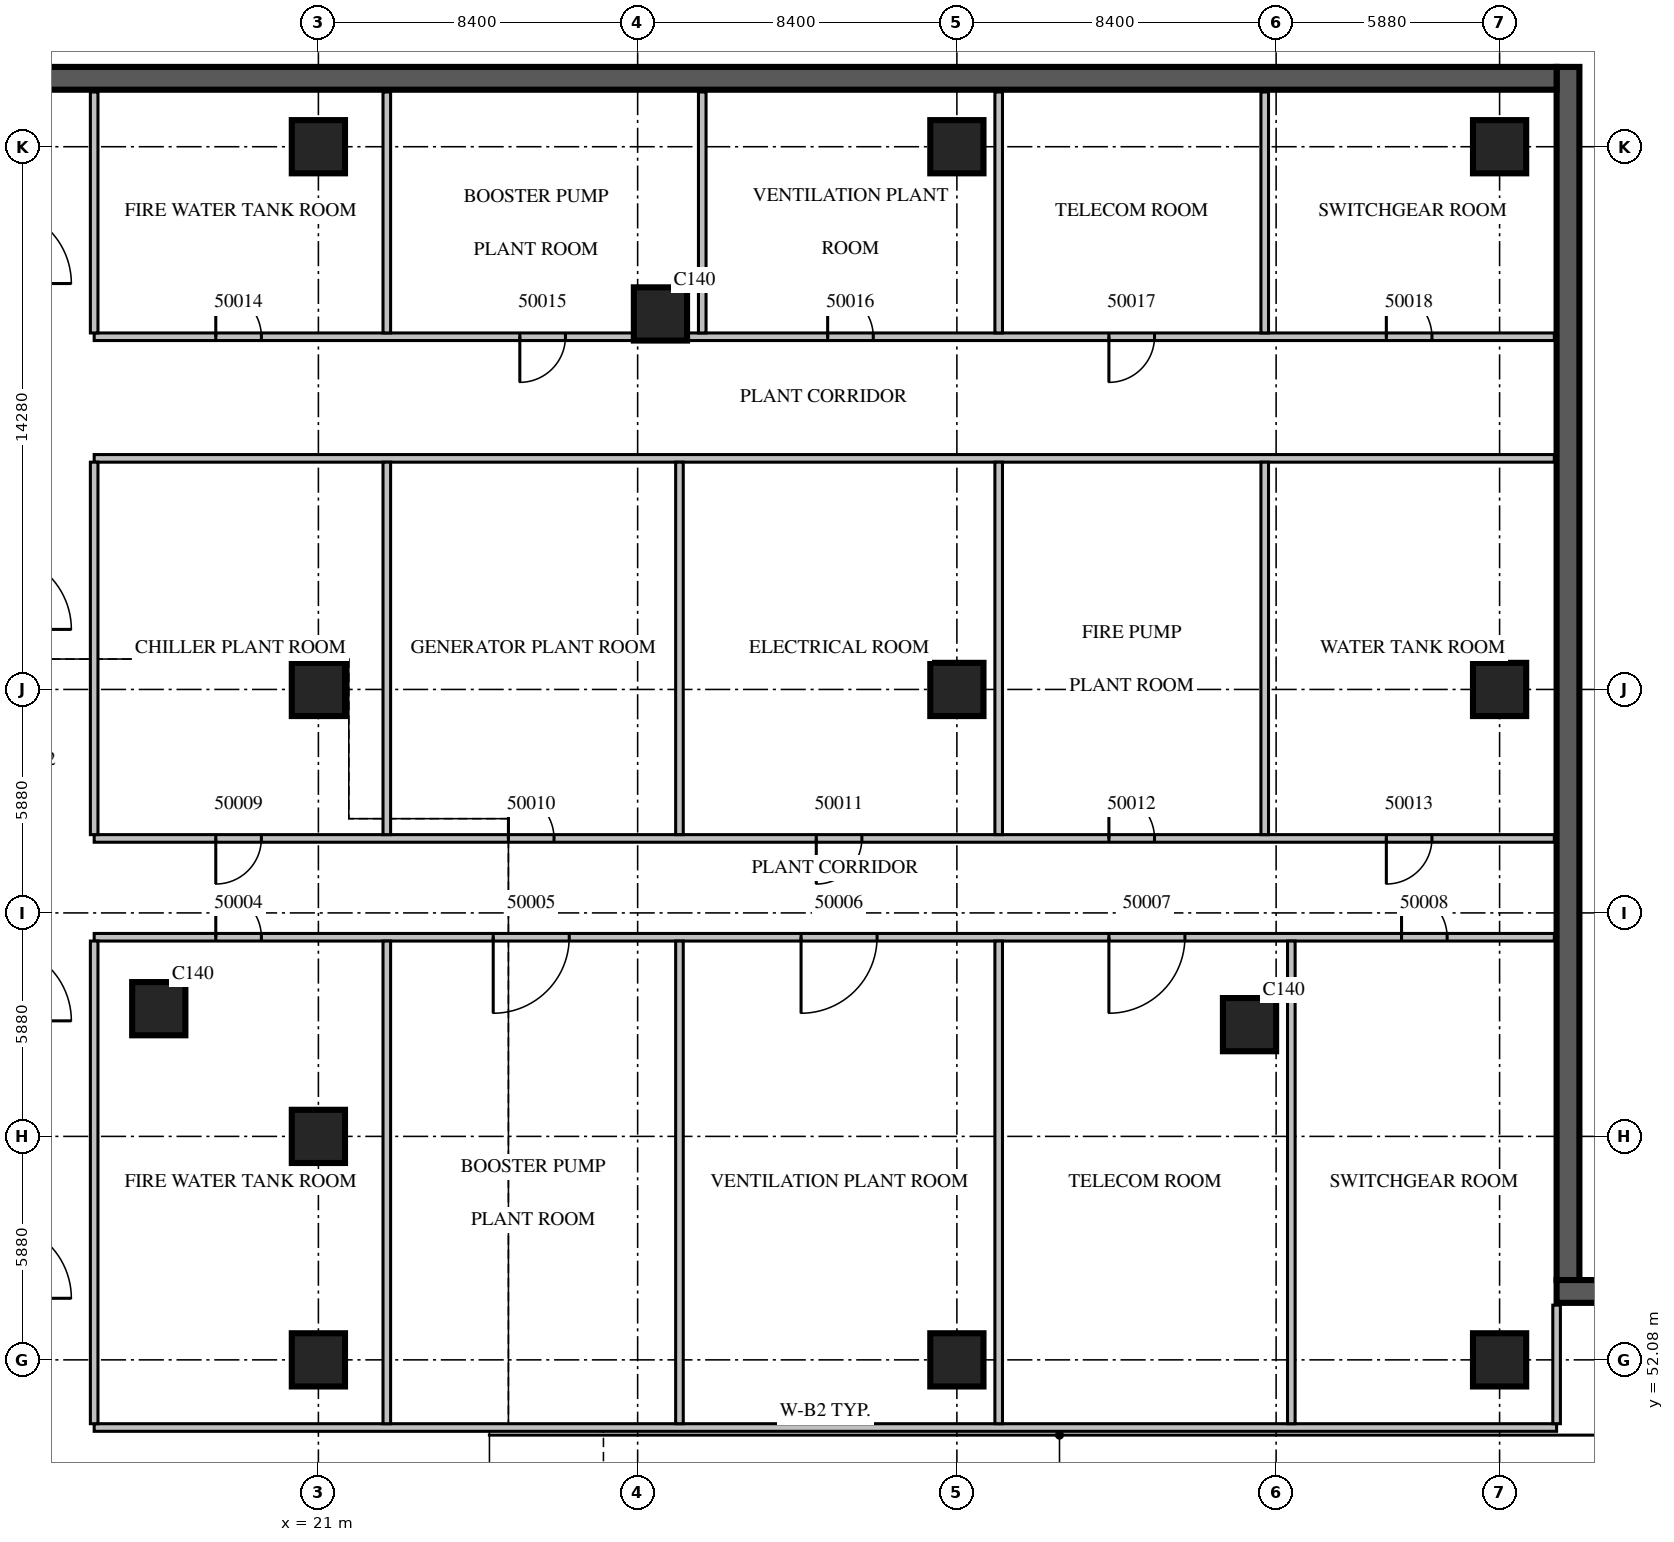
"""IFC4 building model, lengths in metres.
Left out: names, types, materials, properties, quantities, classifications, styles, units other than length and angle.
Written with IfcOpenShell. Run it as: python <this file> out.ifc"""

import sys

from ifc_helpers import new_model, si_unit, direction, frame, frame_2d, origin, origin_2d, place, context, subcontext, project, spatial, rectangle, extrude, source, transform, mapped, element, fill, save


model = new_model("IFC4")
c1 = context("Model", 3, precision=1e-05, world=origin(), true_north=direction((0.0, 1.0)))
c2 = subcontext(c1, "Body", "Model", "MODEL_VIEW")
j1 = project(units=[si_unit("LENGTHUNIT", "METRE"), si_unit("PLANEANGLEUNIT", "RADIAN")], contexts=[c1])
p1 = place(None, origin())
s1 = spatial("IfcSite", under=j1, at=p1, CompositionType="ELEMENT")
p2 = place(p1, origin())
s2 = spatial("IfcBuilding", under=s1, at=p2, CompositionType="ELEMENT")
p3 = place(p2, frame((0.0, 0.0, -13.5)))
s3 = spatial("IfcBuildingStorey", under=s2, at=p3, CompositionType="ELEMENT", Elevation=-13.5)
p4 = place(p3, frame((53.88, 54.18, 0.0), z_axis=(0.0, 0.0, 1.0), x_axis=(0.0, 1.0, 0.0)))
e1 = element("IfcWall", 1, at=p4, inside=s3, PredefinedType="SOLIDWALL", context=c2, shape_type="SweptSolid", body=[
    extrude(rectangle(XDim=31.92, YDim=0.6, at=frame_2d((15.96, 0.0))), origin(), (0.0, 0.0, 1.0), 4.5),
])
p5 = place(p3, frame((53.58, 85.8, 0.0), z_axis=(0.0, 0.0, 1.0), x_axis=(-1.0, 0.0, 0.0)))
e2 = element("IfcWall", 2, at=p5, inside=s3, PredefinedType="SOLIDWALL", context=c2, shape_type="SweptSolid", body=[
    extrude(rectangle(XDim=55.68, YDim=0.6, at=frame_2d((27.84, 0.0))), origin(), (0.0, 0.0, 1.0), 4.5),
])
m1 = source(origin(), c2, "Body", "SweptSolid", [
    extrude(rectangle(XDim=31.92, YDim=0.6, at=frame_2d((15.96, 0.0))), origin(), (0.0, 0.0, 1.0), 4.5),
])
p6 = place(p3, frame((85.5, 53.88, 0.0), z_axis=(0.0, 0.0, 1.0), x_axis=(-1.0, 0.0, 0.0)))
e3 = element("IfcWall", 3, at=p6, inside=s3, PredefinedType="SOLIDWALL", context=c2, shape_type="MappedRepresentation", body=[
    mapped(m1, transform((0.0, 0.0, 0.0), scale=1.0)),
])
m2 = source(origin(), c2, "Body", "SweptSolid", [
    extrude(rectangle(XDim=1.4, YDim=1.4, at=origin_2d()), origin(), (0.0, 0.0, 1.0), 4.5),
])
for number, where, z_axis, x_axis in (
    (4, (16.8, 61.32, 0.0), (0.0, 0.0, 1.0), (1.0, 0.0, 0.0)),
    (5, (21.0, 52.08, 0.0), (0.0, 0.0, 1.0), (1.0, 0.0, 0.0)),
    (6, (21.0, 57.96, 0.0), (0.0, 0.0, 1.0), (1.0, 0.0, 0.0)),
    (7, (21.0, 69.72, 0.0), (0.0, 0.0, 1.0), (1.0, 0.0, 0.0)),
    (8, (21.0, 84.0, 0.0), (0.0, 0.0, 1.0), (1.0, 0.0, 0.0)),
    (9, (30.0, 79.6, 0.0), (0.0, 0.0, 1.0), (1.0, 0.0, 0.0)),
    (10, (37.8, 52.08, 0.0), (0.0, 0.0, 1.0), (1.0, 0.0, 0.0)),
    (11, (37.8, 69.72, 0.0), (0.0, 0.0, 1.0), (1.0, 0.0, 0.0)),
    (12, (37.8, 84.0, 0.0), (0.0, 0.0, 1.0), (1.0, 0.0, 0.0)),
    (13, (45.5, 60.9, 0.0), (0.0, 0.0, 1.0), (1.0, 0.0, 0.0)),
    (14, (52.08, 52.08, 0.0), (0.0, 0.0, 1.0), (1.0, 0.0, 0.0)),
    (15, (52.08, 69.72, 0.0), (0.0, 0.0, 1.0), (1.0, 0.0, 0.0)),
    (16, (52.08, 84.0, 0.0), (0.0, 0.0, 1.0), (1.0, 0.0, 0.0)),
):
    element("IfcColumn", number, at=place(p3, frame(where, z_axis=z_axis, x_axis=x_axis)), inside=s3, PredefinedType="COLUMN", context=c2, shape_type="MappedRepresentation", body=[
        mapped(m2, transform((0.0, 0.0, 0.0), scale=1.0)),
    ])
p7 = place(p3, frame((15.1, 50.3, 0.0), z_axis=(0.0, 0.0, 1.0), x_axis=(1.0, 0.0, 0.0)))
e17 = element("IfcWall", 17, at=p7, inside=s3, PredefinedType="PARTITIONING", context=c2, shape_type="SweptSolid", body=[
    extrude(rectangle(XDim=38.48, YDim=0.2, at=frame_2d((19.24, 0.0))), origin(), (0.0, 0.0, 1.0), 3.9),
])
p8 = place(p3, frame((15.1, 63.2, 0.0), z_axis=(0.0, 0.0, 1.0), x_axis=(1.0, 0.0, 0.0)))
e18 = element("IfcWall", 18, at=p8, inside=s3, PredefinedType="PARTITIONING", context=c2, shape_type="SweptSolid", body=[
    extrude(rectangle(XDim=38.42, YDim=0.2, at=frame_2d((19.21, 0.0))), origin(), (0.0, 0.0, 1.0), 3.9),
])
m3 = source(origin(), c2, "Body", "SweptSolid", [
    extrude(rectangle(XDim=1.2, YDim=2.1, at=frame_2d((0.6, 1.05))), frame((0.0, 0.11, 0.0), z_axis=(0.0, -1.0, 0.0), x_axis=(1.0, 0.0, 0.0)), (0.0, 0.0, 1.0), 0.22),
])
p9 = place(p8, frame((3.2, 0.0, 0.0)))
e19 = element("IfcOpeningElement", 19, at=p9, cuts=e18, PredefinedType="OPENING", context=c2, shape_type="MappedRepresentation", body=[
    mapped(m3, transform((0.0, 0.0, 0.0), scale=1.0)),
])
m4 = source(origin(), c2, "Body", "SweptSolid", [
    extrude(rectangle(XDim=2.0, YDim=2.1, at=frame_2d((1.0, 1.05))), frame((0.0, 0.11, 0.0), z_axis=(0.0, -1.0, 0.0), x_axis=(1.0, 0.0, 0.0)), (0.0, 0.0, 1.0), 0.22),
])
p10 = place(p8, frame((10.5, 0.0, 0.0)))
e20 = element("IfcOpeningElement", 20, at=p10, cuts=e18, PredefinedType="OPENING", context=c2, shape_type="MappedRepresentation", body=[
    mapped(m4, transform((0.0, 0.0, 0.0), scale=1.0)),
])
p11 = place(p8, frame((18.6, 0.0, 0.0)))
e21 = element("IfcOpeningElement", 21, at=p11, cuts=e18, PredefinedType="OPENING", context=c2, shape_type="MappedRepresentation", body=[
    mapped(m4, transform((0.0, 0.0, 0.0), scale=1.0)),
])
p12 = place(p8, frame((26.7, 0.0, 0.0)))
e22 = element("IfcOpeningElement", 22, at=p12, cuts=e18, PredefinedType="OPENING", context=c2, shape_type="MappedRepresentation", body=[
    mapped(m4, transform((0.0, 0.0, 0.0), scale=1.0)),
])
p13 = place(p8, frame((34.4, 0.0, 0.0)))
e23 = element("IfcOpeningElement", 23, at=p13, cuts=e18, PredefinedType="OPENING", context=c2, shape_type="MappedRepresentation", body=[
    mapped(m3, transform((0.0, 0.0, 0.0), scale=1.0)),
])
m5 = source(origin(), c2, "Body", "SweptSolid", [
    extrude(rectangle(XDim=38.42, YDim=0.2, at=frame_2d((19.21, 0.0))), origin(), (0.0, 0.0, 1.0), 3.9),
])
p14 = place(p3, frame((15.1, 65.8, 0.0), z_axis=(0.0, 0.0, 1.0), x_axis=(1.0, 0.0, 0.0)))
e24 = element("IfcWall", 24, at=p14, inside=s3, PredefinedType="PARTITIONING", context=c2, shape_type="MappedRepresentation", body=[
    mapped(m5, transform((0.0, 0.0, 0.0), scale=1.0)),
])
p15 = place(p14, frame((3.2, 0.0, 0.0)))
e25 = element("IfcOpeningElement", 25, at=p15, cuts=e24, PredefinedType="OPENING", context=c2, shape_type="MappedRepresentation", body=[
    mapped(m3, transform((0.0, 0.0, 0.0), scale=1.0)),
])
p16 = place(p14, frame((10.9, 0.0, 0.0)))
e26 = element("IfcOpeningElement", 26, at=p16, cuts=e24, PredefinedType="OPENING", context=c2, shape_type="MappedRepresentation", body=[
    mapped(m3, transform((0.0, 0.0, 0.0), scale=1.0)),
])
p17 = place(p14, frame((19.0, 0.0, 0.0)))
e27 = element("IfcOpeningElement", 27, at=p17, cuts=e24, PredefinedType="OPENING", context=c2, shape_type="MappedRepresentation", body=[
    mapped(m3, transform((0.0, 0.0, 0.0), scale=1.0)),
])
p18 = place(p14, frame((26.7, 0.0, 0.0)))
e28 = element("IfcOpeningElement", 28, at=p18, cuts=e24, PredefinedType="OPENING", context=c2, shape_type="MappedRepresentation", body=[
    mapped(m3, transform((0.0, 0.0, 0.0), scale=1.0)),
])
p19 = place(p14, frame((34.0, 0.0, 0.0)))
e29 = element("IfcOpeningElement", 29, at=p19, cuts=e24, PredefinedType="OPENING", context=c2, shape_type="MappedRepresentation", body=[
    mapped(m3, transform((0.0, 0.0, 0.0), scale=1.0)),
])
p20 = place(p3, frame((15.1, 75.8, 0.0), z_axis=(0.0, 0.0, 1.0), x_axis=(1.0, 0.0, 0.0)))
e30 = element("IfcWall", 30, at=p20, inside=s3, PredefinedType="PARTITIONING", context=c2, shape_type="MappedRepresentation", body=[
    mapped(m5, transform((0.0, 0.0, 0.0), scale=1.0)),
])
p21 = place(p3, frame((15.1, 79.0, 0.0), z_axis=(0.0, 0.0, 1.0), x_axis=(1.0, 0.0, 0.0)))
e31 = element("IfcWall", 31, at=p21, inside=s3, PredefinedType="PARTITIONING", context=c2, shape_type="MappedRepresentation", body=[
    mapped(m5, transform((0.0, 0.0, 0.0), scale=1.0)),
])
p22 = place(p21, frame((3.2, 0.0, 0.0)))
e32 = element("IfcOpeningElement", 32, at=p22, cuts=e31, PredefinedType="OPENING", context=c2, shape_type="MappedRepresentation", body=[
    mapped(m3, transform((0.0, 0.0, 0.0), scale=1.0)),
])
p23 = place(p21, frame((11.2, 0.0, 0.0)))
e33 = element("IfcOpeningElement", 33, at=p23, cuts=e31, PredefinedType="OPENING", context=c2, shape_type="MappedRepresentation", body=[
    mapped(m3, transform((0.0, 0.0, 0.0), scale=1.0)),
])
p24 = place(p21, frame((19.3, 0.0, 0.0)))
e34 = element("IfcOpeningElement", 34, at=p24, cuts=e31, PredefinedType="OPENING", context=c2, shape_type="MappedRepresentation", body=[
    mapped(m3, transform((0.0, 0.0, 0.0), scale=1.0)),
])
p25 = place(p21, frame((26.7, 0.0, 0.0)))
e35 = element("IfcOpeningElement", 35, at=p25, cuts=e31, PredefinedType="OPENING", context=c2, shape_type="MappedRepresentation", body=[
    mapped(m3, transform((0.0, 0.0, 0.0), scale=1.0)),
])
p26 = place(p21, frame((34.0, 0.0, 0.0)))
e36 = element("IfcOpeningElement", 36, at=p26, cuts=e31, PredefinedType="OPENING", context=c2, shape_type="MappedRepresentation", body=[
    mapped(m3, transform((0.0, 0.0, 0.0), scale=1.0)),
])
p27 = place(p3, frame((15.1, 50.4, 0.0), z_axis=(0.0, 0.0, 1.0), x_axis=(0.0, 1.0, 0.0)))
e37 = element("IfcWall", 37, at=p27, inside=s3, PredefinedType="PARTITIONING", context=c2, shape_type="SweptSolid", body=[
    extrude(rectangle(XDim=12.7, YDim=0.2, at=frame_2d((6.35, 0.0))), origin(), (0.0, 0.0, 1.0), 3.9),
])
p28 = place(p3, frame((15.1, 65.9, 0.0), z_axis=(0.0, 0.0, 1.0), x_axis=(0.0, 1.0, 0.0)))
e38 = element("IfcWall", 38, at=p28, inside=s3, PredefinedType="PARTITIONING", context=c2, shape_type="SweptSolid", body=[
    extrude(rectangle(XDim=9.8, YDim=0.2, at=frame_2d((4.9, 0.0))), origin(), (0.0, 0.0, 1.0), 3.9),
])
p29 = place(p3, frame((15.1, 79.1, 0.0), z_axis=(0.0, 0.0, 1.0), x_axis=(0.0, 1.0, 0.0)))
e39 = element("IfcWall", 39, at=p29, inside=s3, PredefinedType="PARTITIONING", context=c2, shape_type="SweptSolid", body=[
    extrude(rectangle(XDim=6.34, YDim=0.2, at=frame_2d((3.17, 0.0))), origin(), (0.0, 0.0, 1.0), 3.9),
])
m6 = source(origin(), c2, "Body", "SweptSolid", [
    extrude(rectangle(XDim=12.7, YDim=0.2, at=frame_2d((6.35, 0.0))), origin(), (0.0, 0.0, 1.0), 3.9),
])
p30 = place(p3, frame((22.8, 50.4, 0.0), z_axis=(0.0, 0.0, 1.0), x_axis=(0.0, 1.0, 0.0)))
e40 = element("IfcWall", 40, at=p30, inside=s3, PredefinedType="PARTITIONING", context=c2, shape_type="MappedRepresentation", body=[
    mapped(m6, transform((0.0, 0.0, 0.0), scale=1.0)),
])
m7 = source(origin(), c2, "Body", "SweptSolid", [
    extrude(rectangle(XDim=9.8, YDim=0.2, at=frame_2d((4.9, 0.0))), origin(), (0.0, 0.0, 1.0), 3.9),
])
p31 = place(p3, frame((22.8, 65.9, 0.0), z_axis=(0.0, 0.0, 1.0), x_axis=(0.0, 1.0, 0.0)))
e41 = element("IfcWall", 41, at=p31, inside=s3, PredefinedType="PARTITIONING", context=c2, shape_type="MappedRepresentation", body=[
    mapped(m7, transform((0.0, 0.0, 0.0), scale=1.0)),
])
m8 = source(origin(), c2, "Body", "SweptSolid", [
    extrude(rectangle(XDim=6.34, YDim=0.2, at=frame_2d((3.17, 0.0))), origin(), (0.0, 0.0, 1.0), 3.9),
])
p32 = place(p3, frame((22.8, 79.1, 0.0), z_axis=(0.0, 0.0, 1.0), x_axis=(0.0, 1.0, 0.0)))
e42 = element("IfcWall", 42, at=p32, inside=s3, PredefinedType="PARTITIONING", context=c2, shape_type="MappedRepresentation", body=[
    mapped(m8, transform((0.0, 0.0, 0.0), scale=1.0)),
])
p33 = place(p3, frame((30.5, 50.4, 0.0), z_axis=(0.0, 0.0, 1.0), x_axis=(0.0, 1.0, 0.0)))
e43 = element("IfcWall", 43, at=p33, inside=s3, PredefinedType="PARTITIONING", context=c2, shape_type="MappedRepresentation", body=[
    mapped(m6, transform((0.0, 0.0, 0.0), scale=1.0)),
])
p34 = place(p3, frame((30.5, 65.9, 0.0), z_axis=(0.0, 0.0, 1.0), x_axis=(0.0, 1.0, 0.0)))
e44 = element("IfcWall", 44, at=p34, inside=s3, PredefinedType="PARTITIONING", context=c2, shape_type="MappedRepresentation", body=[
    mapped(m7, transform((0.0, 0.0, 0.0), scale=1.0)),
])
p35 = place(p3, frame((31.1, 79.1, 0.0), z_axis=(0.0, 0.0, 1.0), x_axis=(0.0, 1.0, 0.0)))
e45 = element("IfcWall", 45, at=p35, inside=s3, PredefinedType="PARTITIONING", context=c2, shape_type="MappedRepresentation", body=[
    mapped(m8, transform((0.0, 0.0, 0.0), scale=1.0)),
])
p36 = place(p3, frame((38.9, 50.4, 0.0), z_axis=(0.0, 0.0, 1.0), x_axis=(0.0, 1.0, 0.0)))
e46 = element("IfcWall", 46, at=p36, inside=s3, PredefinedType="PARTITIONING", context=c2, shape_type="MappedRepresentation", body=[
    mapped(m6, transform((0.0, 0.0, 0.0), scale=1.0)),
])
p37 = place(p3, frame((38.9, 65.9, 0.0), z_axis=(0.0, 0.0, 1.0), x_axis=(0.0, 1.0, 0.0)))
e47 = element("IfcWall", 47, at=p37, inside=s3, PredefinedType="PARTITIONING", context=c2, shape_type="MappedRepresentation", body=[
    mapped(m7, transform((0.0, 0.0, 0.0), scale=1.0)),
])
p38 = place(p3, frame((38.9, 79.1, 0.0), z_axis=(0.0, 0.0, 1.0), x_axis=(0.0, 1.0, 0.0)))
e48 = element("IfcWall", 48, at=p38, inside=s3, PredefinedType="PARTITIONING", context=c2, shape_type="MappedRepresentation", body=[
    mapped(m8, transform((0.0, 0.0, 0.0), scale=1.0)),
])
p39 = place(p3, frame((45.9, 65.9, 0.0), z_axis=(0.0, 0.0, 1.0), x_axis=(0.0, 1.0, 0.0)))
e49 = element("IfcWall", 49, at=p39, inside=s3, PredefinedType="PARTITIONING", context=c2, shape_type="MappedRepresentation", body=[
    mapped(m7, transform((0.0, 0.0, 0.0), scale=1.0)),
])
p40 = place(p3, frame((45.9, 79.1, 0.0), z_axis=(0.0, 0.0, 1.0), x_axis=(0.0, 1.0, 0.0)))
e50 = element("IfcWall", 50, at=p40, inside=s3, PredefinedType="PARTITIONING", context=c2, shape_type="MappedRepresentation", body=[
    mapped(m8, transform((0.0, 0.0, 0.0), scale=1.0)),
])
p41 = place(p3, frame((46.6, 50.4, 0.0), z_axis=(0.0, 0.0, 1.0), x_axis=(0.0, 1.0, 0.0)))
e51 = element("IfcWall", 51, at=p41, inside=s3, PredefinedType="PARTITIONING", context=c2, shape_type="MappedRepresentation", body=[
    mapped(m6, transform((0.0, 0.0, 0.0), scale=1.0)),
])
p42 = place(p3, frame((53.58, 50.4, 0.0), z_axis=(0.0, 0.0, 1.0), x_axis=(0.0, 1.0, 0.0)))
e52 = element("IfcWall", 52, at=p42, inside=s3, PredefinedType="PARTITIONING", context=c2, shape_type="SweptSolid", body=[
    extrude(rectangle(XDim=3.12, YDim=0.2, at=frame_2d((1.56, 0.0))), origin(), (0.0, 0.0, 1.0), 3.9),
])
m9 = source(origin(), c2, "Body", "SweptSolid", [
    extrude(rectangle(XDim=1.2, YDim=2.1, at=frame_2d((0.6, 1.05))), frame((0.0, 0.025, 0.0), z_axis=(0.0, -1.0, 0.0), x_axis=(1.0, 0.0, 0.0)), (0.0, 0.0, 1.0), 0.05),
])
p43 = place(p9, origin())
e53 = element("IfcDoor", 53, at=p43, inside=s3, OperationType="SINGLE_SWING_LEFT", PredefinedType="DOOR", context=c2, shape_type="MappedRepresentation", body=[
    mapped(m9, transform((0.0, 0.0, 0.0), scale=1.0)),
])
fill(e19, e53)
m10 = source(origin(), c2, "Body", "SweptSolid", [
    extrude(rectangle(XDim=2.0, YDim=2.1, at=frame_2d((1.0, 1.05))), frame((0.0, 0.025, 0.0), z_axis=(0.0, -1.0, 0.0), x_axis=(1.0, 0.0, 0.0)), (0.0, 0.0, 1.0), 0.05),
])
p44 = place(p10, origin())
e54 = element("IfcDoor", 54, at=p44, inside=s3, OperationType="DOUBLE_DOOR_SINGLE_SWING", PredefinedType="DOOR", context=c2, shape_type="MappedRepresentation", body=[
    mapped(m10, transform((0.0, 0.0, 0.0), scale=1.0)),
])
fill(e20, e54)
p45 = place(p11, origin())
e55 = element("IfcDoor", 55, at=p45, inside=s3, OperationType="DOUBLE_DOOR_SINGLE_SWING", PredefinedType="DOOR", context=c2, shape_type="MappedRepresentation", body=[
    mapped(m10, transform((0.0, 0.0, 0.0), scale=1.0)),
])
fill(e21, e55)
p46 = place(p12, origin())
e56 = element("IfcDoor", 56, at=p46, inside=s3, OperationType="DOUBLE_DOOR_SINGLE_SWING", PredefinedType="DOOR", context=c2, shape_type="MappedRepresentation", body=[
    mapped(m10, transform((0.0, 0.0, 0.0), scale=1.0)),
])
fill(e22, e56)
p47 = place(p13, origin())
e57 = element("IfcDoor", 57, at=p47, inside=s3, OperationType="SINGLE_SWING_LEFT", PredefinedType="DOOR", context=c2, shape_type="MappedRepresentation", body=[
    mapped(m9, transform((0.0, 0.0, 0.0), scale=1.0)),
])
fill(e23, e57)
p48 = place(p15, origin())
e58 = element("IfcDoor", 58, at=p48, inside=s3, OperationType="SINGLE_SWING_RIGHT", PredefinedType="DOOR", context=c2, shape_type="MappedRepresentation", body=[
    mapped(m9, transform((0.0, 0.0, 0.0), scale=1.0)),
])
fill(e25, e58)
p49 = place(p16, origin())
e59 = element("IfcDoor", 59, at=p49, inside=s3, OperationType="SINGLE_SWING_LEFT", PredefinedType="DOOR", context=c2, shape_type="MappedRepresentation", body=[
    mapped(m9, transform((0.0, 0.0, 0.0), scale=1.0)),
])
fill(e26, e59)
p50 = place(p17, origin())
e60 = element("IfcDoor", 60, at=p50, inside=s3, OperationType="SINGLE_SWING_RIGHT", PredefinedType="DOOR", context=c2, shape_type="MappedRepresentation", body=[
    mapped(m9, transform((0.0, 0.0, 0.0), scale=1.0)),
])
fill(e27, e60)
p51 = place(p18, origin())
e61 = element("IfcDoor", 61, at=p51, inside=s3, OperationType="SINGLE_SWING_LEFT", PredefinedType="DOOR", context=c2, shape_type="MappedRepresentation", body=[
    mapped(m9, transform((0.0, 0.0, 0.0), scale=1.0)),
])
fill(e28, e61)
p52 = place(p19, origin())
e62 = element("IfcDoor", 62, at=p52, inside=s3, OperationType="SINGLE_SWING_RIGHT", PredefinedType="DOOR", context=c2, shape_type="MappedRepresentation", body=[
    mapped(m9, transform((0.0, 0.0, 0.0), scale=1.0)),
])
fill(e29, e62)
p53 = place(p22, origin())
e63 = element("IfcDoor", 63, at=p53, inside=s3, OperationType="SINGLE_SWING_LEFT", PredefinedType="DOOR", context=c2, shape_type="MappedRepresentation", body=[
    mapped(m9, transform((0.0, 0.0, 0.0), scale=1.0)),
])
fill(e32, e63)
p54 = place(p23, origin())
e64 = element("IfcDoor", 64, at=p54, inside=s3, OperationType="SINGLE_SWING_RIGHT", PredefinedType="DOOR", context=c2, shape_type="MappedRepresentation", body=[
    mapped(m9, transform((0.0, 0.0, 0.0), scale=1.0)),
])
fill(e33, e64)
p55 = place(p24, origin())
e65 = element("IfcDoor", 65, at=p55, inside=s3, OperationType="SINGLE_SWING_LEFT", PredefinedType="DOOR", context=c2, shape_type="MappedRepresentation", body=[
    mapped(m9, transform((0.0, 0.0, 0.0), scale=1.0)),
])
fill(e34, e65)
p56 = place(p25, origin())
e66 = element("IfcDoor", 66, at=p56, inside=s3, OperationType="SINGLE_SWING_RIGHT", PredefinedType="DOOR", context=c2, shape_type="MappedRepresentation", body=[
    mapped(m9, transform((0.0, 0.0, 0.0), scale=1.0)),
])
fill(e35, e66)
p57 = place(p26, origin())
e67 = element("IfcDoor", 67, at=p57, inside=s3, OperationType="SINGLE_SWING_LEFT", PredefinedType="DOOR", context=c2, shape_type="MappedRepresentation", body=[
    mapped(m9, transform((0.0, 0.0, 0.0), scale=1.0)),
])
fill(e36, e67)
save(model, sys.argv[1])
